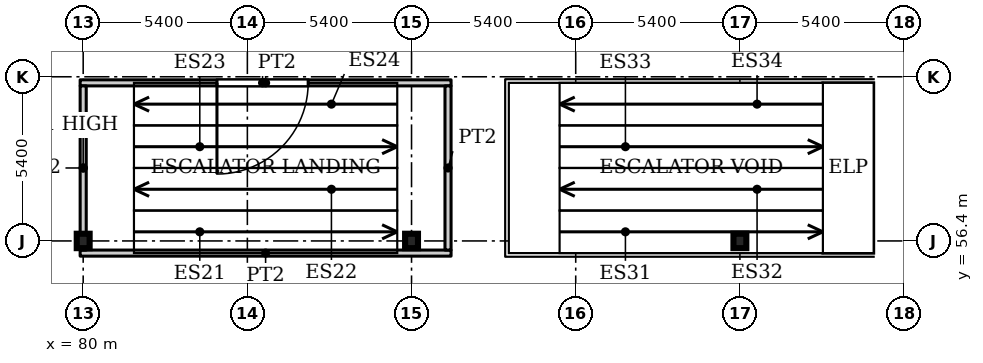
"""IFC4 building model, lengths in metres.
Left out: names, types, materials, properties, quantities, classifications, styles, units other than length and angle.
Written with IfcOpenShell. Run it as: python <this file> out.ifc"""

import sys

from ifc_helpers import new_model, si_unit, direction, frame, frame_2d, origin, origin_2d, place, context, subcontext, project, spatial, rectangle, i_section, extrude, source, transform, mapped, element, fill, save


model = new_model("IFC4")
c1 = context("Model", 3, precision=1e-05, world=origin(), true_north=direction((0.0, 1.0)))
c2 = subcontext(c1, "Body", "Model", "MODEL_VIEW")
j1 = project(units=[si_unit("LENGTHUNIT", "METRE"), si_unit("PLANEANGLEUNIT", "RADIAN")], contexts=[c1])
p1 = place(None, origin())
s1 = spatial("IfcSite", under=j1, at=p1, CompositionType="ELEMENT")
p2 = place(p1, origin())
s2 = spatial("IfcBuilding", under=s1, at=p2, CompositionType="ELEMENT")
p3 = place(p2, frame((0.0, 0.0, -10.0)))
s3 = spatial("IfcBuildingStorey", under=s2, at=p3, CompositionType="ELEMENT", Elevation=-10.0)
for number, where, z_axis, x_axis in (
    (1, (80.0, 56.4, 0.0), (0.0, 0.0, 1.0), (1.0, 0.0, 0.0)),
    (2, (90.8, 56.4, 0.0), (0.0, 0.0, 1.0), (1.0, 0.0, 0.0)),
    (3, (101.6, 56.4, 0.0), (0.0, 0.0, 1.0), (1.0, 0.0, 0.0)),
):
    element("IfcColumn", number, at=place(p3, frame(where, z_axis=z_axis, x_axis=x_axis)), inside=s3, PredefinedType="COLUMN", context=c2, shape_type="SweptSolid", body=[
        extrude(i_section(OverallWidth=0.424, OverallDepth=0.474, WebThickness=0.048, FlangeThickness=0.077, FilletRadius=0.014, at=origin_2d()), origin(), (0.0, 0.0, 1.0), 5.0),
    ])
p4 = place(p3, frame((79.9, 56.0, 0.0), z_axis=(0.0, 0.0, 1.0), x_axis=(1.0, 0.0, 0.0)))
e4 = element("IfcWall", 4, at=p4, inside=s3, PredefinedType="PARTITIONING", context=c2, shape_type="SweptSolid", body=[
    extrude(rectangle(XDim=12.2, YDim=0.2, at=frame_2d((6.1, 0.0))), origin(), (0.0, 0.0, 1.0), 4.58),
])
p5 = place(p3, frame((79.9, 61.6, 0.0), z_axis=(0.0, 0.0, 1.0), x_axis=(1.0, 0.0, 0.0)))
e5 = element("IfcWall", 5, at=p5, inside=s3, PredefinedType="PARTITIONING", context=c2, shape_type="SweptSolid", body=[
    extrude(rectangle(XDim=12.2, YDim=0.2, at=frame_2d((6.1, 0.0))), origin(), (0.0, 0.0, 1.0), 4.58),
])
p6 = place(p5, frame((4.5, 0.0, 0.0)))
e6 = element("IfcOpeningElement", 6, at=p6, cuts=e5, PredefinedType="OPENING", context=c2, shape_type="SweptSolid", body=[
    extrude(rectangle(XDim=3.0, YDim=2.1, at=frame_2d((1.5, 1.05))), frame((0.0, 0.11, 0.0), z_axis=(0.0, -1.0, 0.0), x_axis=(1.0, 0.0, 0.0)), (0.0, 0.0, 1.0), 0.22),
])
p7 = place(p3, frame((80.0, 56.1, 0.0), z_axis=(0.0, 0.0, 1.0), x_axis=(0.0, 1.0, 0.0)))
e7 = element("IfcWall", 7, at=p7, inside=s3, PredefinedType="PARTITIONING", context=c2, shape_type="SweptSolid", body=[
    extrude(rectangle(XDim=5.4, YDim=0.2, at=frame_2d((2.7, 0.0))), origin(), (0.0, 0.0, 1.0), 4.111),
])
p8 = place(p3, frame((92.0, 56.1, 0.0), z_axis=(0.0, 0.0, 1.0), x_axis=(0.0, 1.0, 0.0)))
e8 = element("IfcWall", 8, at=p8, inside=s3, PredefinedType="PARTITIONING", context=c2, shape_type="SweptSolid", body=[
    extrude(rectangle(XDim=5.4, YDim=0.2, at=frame_2d((2.7, 0.0))), origin(), (0.0, 0.0, 1.0), 4.58),
])
m1 = source(origin(), c2, "Body", "SweptSolid", [
    extrude(rectangle(XDim=3.0, YDim=2.1, at=frame_2d((1.5, 1.05))), frame((0.0, 0.025, 0.0), z_axis=(0.0, -1.0, 0.0), x_axis=(1.0, 0.0, 0.0)), (0.0, 0.0, 1.0), 0.05),
])
p9 = place(p6, origin())
e9 = element("IfcDoor", 9, at=p9, inside=s3, OperationType="DOUBLE_DOOR_SINGLE_SWING", PredefinedType="DOOR", context=c2, shape_type="MappedRepresentation", body=[
    mapped(m1, transform((0.0, 0.0, 0.0), x_axis=(1.0, 0.0, 0.0), y_axis=(0.0, 1.0, 0.0), z_axis=(0.0, 0.0, 1.0), scale=1.0)),
])
fill(e6, e9)
save(model, sys.argv[1])
